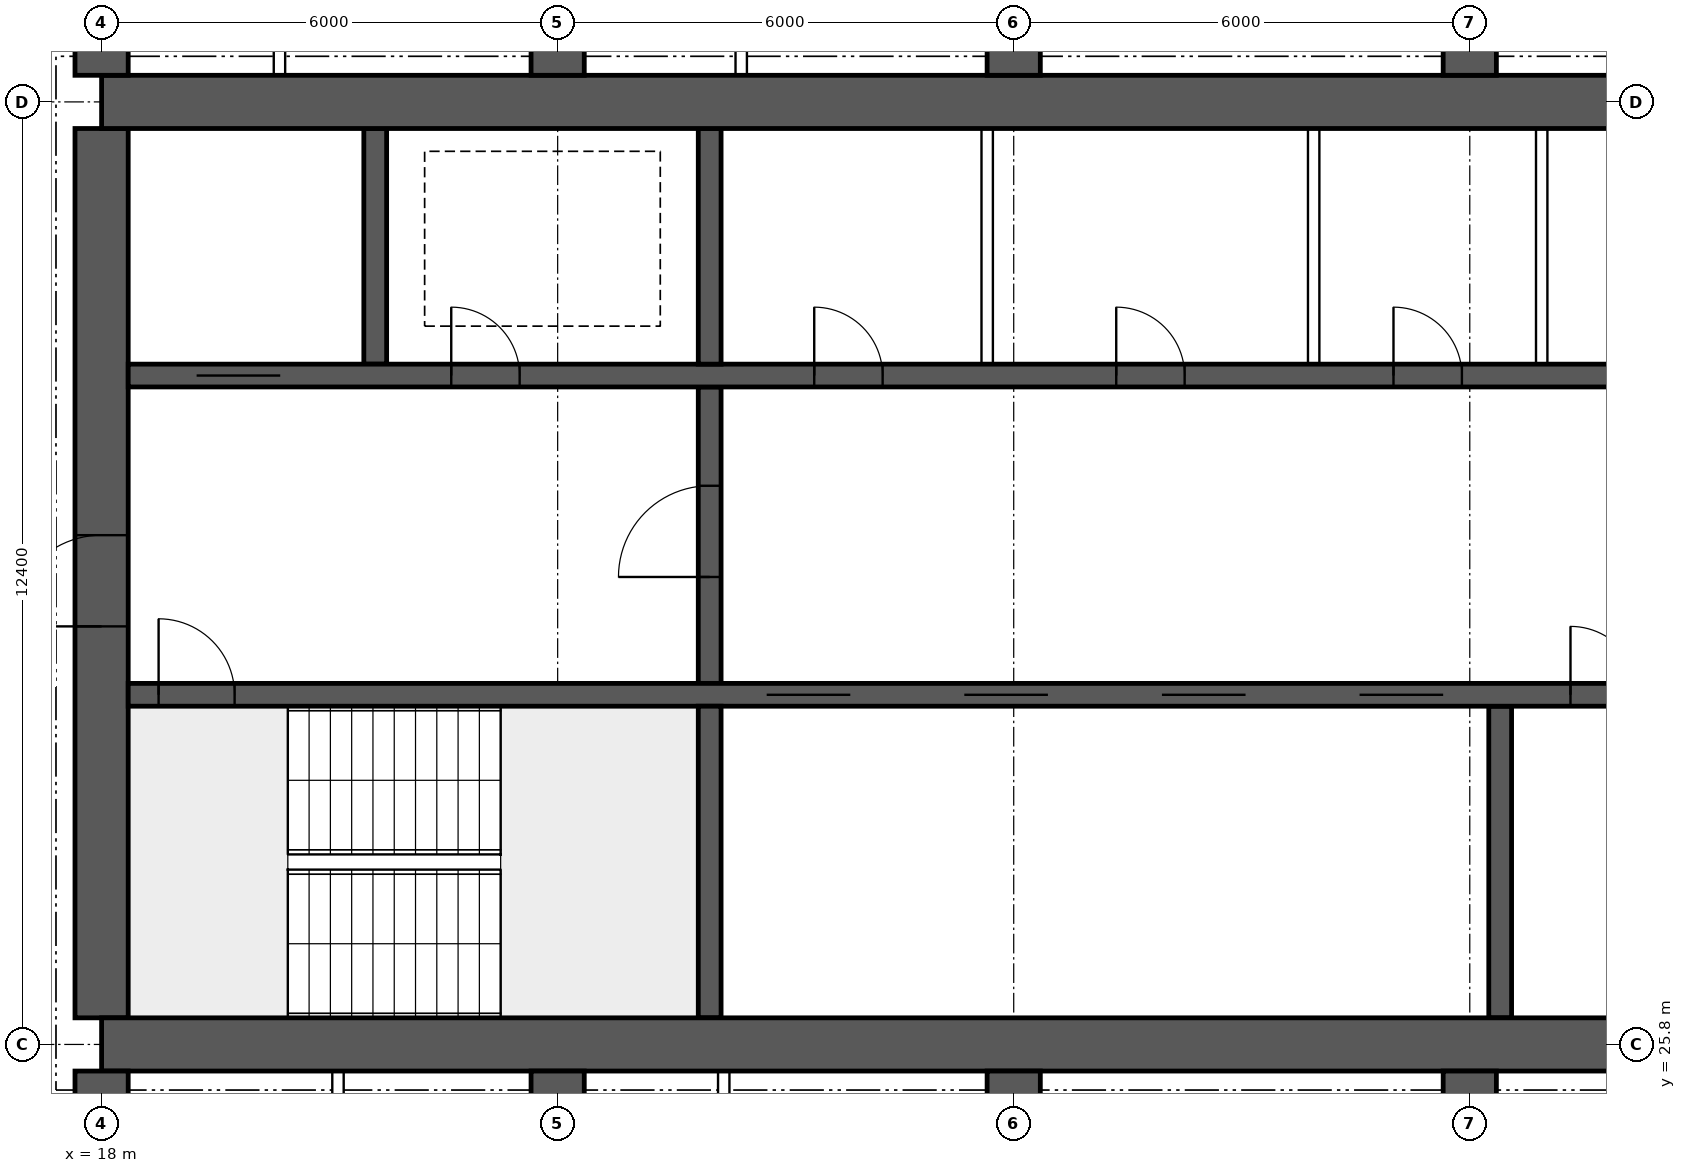
"""IFC4 building model, lengths in metres.
Left out: names, types, materials, properties, quantities, classifications, styles, units other than length and angle.
Written with IfcOpenShell. Run it as: python <this file> out.ifc"""

import sys

from ifc_helpers import new_model, si_unit, direction, frame, frame_2d, origin, place, context, subcontext, project, spatial, rectangle, extrude, element, fill, save


model = new_model("IFC4")
c1 = context("Model", 3, precision=1e-05, world=origin(), true_north=direction((0.0, 1.0)))
c2 = subcontext(c1, "Body", "Model", "MODEL_VIEW")
j1 = project(units=[si_unit("LENGTHUNIT", "METRE"), si_unit("PLANEANGLEUNIT", "RADIAN")], contexts=[c1])
p1 = place(None, origin())
s1 = spatial("IfcSite", under=j1, at=p1, CompositionType="ELEMENT")
p2 = place(p1, origin())
s2 = spatial("IfcBuilding", under=s1, at=p2, CompositionType="ELEMENT")
p3 = place(p2, frame((0.0, 0.0, 250.3)))
s3 = spatial("IfcBuildingStorey", under=s2, at=p3, CompositionType="ELEMENT", Elevation=250.3)
for number, where, z_axis, x_axis in (
    (1, (18.0, 25.8, 0.0), (0.0, 0.0, 1.0), (1.0, 0.0, 0.0)),
    (2, (18.0, 38.2, 0.0), (0.0, 0.0, 1.0), (1.0, 0.0, 0.0)),
):
    element("IfcWall", number, at=place(p3, frame(where, z_axis=z_axis, x_axis=x_axis)), inside=s3, PredefinedType="SHEAR", context=c2, shape_type="SweptSolid", body=[
        extrude(rectangle(XDim=48.0, YDim=0.7, at=frame_2d((24.0, 0.0))), origin(), (0.0, 0.0, 1.0), 3.75),
    ])
p4 = place(p3, frame((18.0, 26.15, 0.0), z_axis=(0.0, 0.0, 1.0), x_axis=(0.0, 1.0, 0.0)))
e3 = element("IfcWall", 3, at=p4, inside=s3, PredefinedType="SHEAR", context=c2, shape_type="SweptSolid", body=[
    extrude(rectangle(XDim=11.7, YDim=0.7, at=frame_2d((5.85, 0.0))), origin(), (0.0, 0.0, 1.0), 3.75),
])
p5 = place(p4, frame((5.15, 0.0, 0.0)))
e4 = element("IfcOpeningElement", 4, at=p5, cuts=e3, PredefinedType="OPENING", context=c2, shape_type="SweptSolid", body=[
    extrude(rectangle(XDim=1.2, YDim=2.1, at=frame_2d((0.6, 1.05))), frame((0.0, 0.36, 0.0), z_axis=(0.0, -1.0, 0.0), x_axis=(1.0, 0.0, 0.0)), (0.0, 0.0, 1.0), 0.72),
])
p6 = place(p3, frame((18.35, 30.4, 0.0), z_axis=(0.0, 0.0, 1.0), x_axis=(1.0, 0.0, 0.0)))
e5 = element("IfcWall", 5, at=p6, inside=s3, PredefinedType="SHEAR", context=c2, shape_type="SweptSolid", body=[
    extrude(rectangle(XDim=47.3, YDim=0.3, at=frame_2d((23.65, 0.0))), origin(), (0.0, 0.0, 1.0), 3.75),
])
p7 = place(p6, frame((0.4, 0.0, 0.0)))
e6 = element("IfcOpeningElement", 6, at=p7, cuts=e5, PredefinedType="OPENING", context=c2, shape_type="SweptSolid", body=[
    extrude(rectangle(XDim=1.0, YDim=2.1, at=frame_2d((0.5, 1.05))), frame((0.0, 0.16, 0.0), z_axis=(0.0, -1.0, 0.0), x_axis=(1.0, 0.0, 0.0)), (0.0, 0.0, 1.0), 0.32),
])
p8 = place(p6, frame((45.9, 0.0, 0.0)))
e7 = element("IfcOpeningElement", 7, at=p8, cuts=e5, PredefinedType="OPENING", context=c2, shape_type="SweptSolid", body=[
    extrude(rectangle(XDim=1.0, YDim=2.1, at=frame_2d((0.5, 1.05))), frame((0.0, 0.16, 0.0), z_axis=(0.0, -1.0, 0.0), x_axis=(1.0, 0.0, 0.0)), (0.0, 0.0, 1.0), 0.32),
])
p9 = place(p6, frame((8.4, 0.0, 0.0)))
e8 = element("IfcOpeningElement", 8, at=p9, cuts=e5, PredefinedType="OPENING", context=c2, shape_type="SweptSolid", body=[
    extrude(rectangle(XDim=1.1, YDim=2.1, at=frame_2d((0.55, 1.05))), frame((0.0, 0.16, 0.0), z_axis=(0.0, -1.0, 0.0), x_axis=(1.0, 0.0, 0.0)), (0.0, 0.0, 1.0), 0.32),
])
p10 = place(p6, frame((11.0, 0.0, 0.0)))
e9 = element("IfcOpeningElement", 9, at=p10, cuts=e5, PredefinedType="OPENING", context=c2, shape_type="SweptSolid", body=[
    extrude(rectangle(XDim=1.1, YDim=2.1, at=frame_2d((0.55, 1.05))), frame((0.0, 0.16, 0.0), z_axis=(0.0, -1.0, 0.0), x_axis=(1.0, 0.0, 0.0)), (0.0, 0.0, 1.0), 0.32),
])
p11 = place(p6, frame((13.6, 0.0, 0.0)))
e10 = element("IfcOpeningElement", 10, at=p11, cuts=e5, PredefinedType="OPENING", context=c2, shape_type="SweptSolid", body=[
    extrude(rectangle(XDim=1.1, YDim=2.1, at=frame_2d((0.55, 1.05))), frame((0.0, 0.16, 0.0), z_axis=(0.0, -1.0, 0.0), x_axis=(1.0, 0.0, 0.0)), (0.0, 0.0, 1.0), 0.32),
])
p12 = place(p6, frame((16.2, 0.0, 0.0)))
e11 = element("IfcOpeningElement", 11, at=p12, cuts=e5, PredefinedType="OPENING", context=c2, shape_type="SweptSolid", body=[
    extrude(rectangle(XDim=1.1, YDim=2.1, at=frame_2d((0.55, 1.05))), frame((0.0, 0.16, 0.0), z_axis=(0.0, -1.0, 0.0), x_axis=(1.0, 0.0, 0.0)), (0.0, 0.0, 1.0), 0.32),
])
p13 = place(p6, frame((18.975, 0.0, 0.0)))
e12 = element("IfcOpeningElement", 12, at=p13, cuts=e5, PredefinedType="OPENING", context=c2, shape_type="SweptSolid", body=[
    extrude(rectangle(XDim=0.9, YDim=2.1, at=frame_2d((0.45, 1.05))), frame((0.0, 0.16, 0.0), z_axis=(0.0, -1.0, 0.0), x_axis=(1.0, 0.0, 0.0)), (0.0, 0.0, 1.0), 0.32),
])
p14 = place(p6, frame((24.475, 0.0, 0.0)))
e13 = element("IfcOpeningElement", 13, at=p14, cuts=e5, PredefinedType="OPENING", context=c2, shape_type="SweptSolid", body=[
    extrude(rectangle(XDim=0.9, YDim=2.1, at=frame_2d((0.45, 1.05))), frame((0.0, 0.16, 0.0), z_axis=(0.0, -1.0, 0.0), x_axis=(1.0, 0.0, 0.0)), (0.0, 0.0, 1.0), 0.32),
])
p15 = place(p6, frame((30.267, 0.0, 0.0)))
e14 = element("IfcOpeningElement", 14, at=p15, cuts=e5, PredefinedType="OPENING", context=c2, shape_type="SweptSolid", body=[
    extrude(rectangle(XDim=1.1, YDim=2.1, at=frame_2d((0.55, 1.05))), frame((0.0, 0.16, 0.0), z_axis=(0.0, -1.0, 0.0), x_axis=(1.0, 0.0, 0.0)), (0.0, 0.0, 1.0), 0.32),
])
p16 = place(p6, frame((33.8, 0.0, 0.0)))
e15 = element("IfcOpeningElement", 15, at=p16, cuts=e5, PredefinedType="OPENING", context=c2, shape_type="SweptSolid", body=[
    extrude(rectangle(XDim=1.1, YDim=2.1, at=frame_2d((0.55, 1.05))), frame((0.0, 0.16, 0.0), z_axis=(0.0, -1.0, 0.0), x_axis=(1.0, 0.0, 0.0)), (0.0, 0.0, 1.0), 0.32),
])
p17 = place(p6, frame((37.333, 0.0, 0.0)))
e16 = element("IfcOpeningElement", 16, at=p17, cuts=e5, PredefinedType="OPENING", context=c2, shape_type="SweptSolid", body=[
    extrude(rectangle(XDim=1.1, YDim=2.1, at=frame_2d((0.55, 1.05))), frame((0.0, 0.16, 0.0), z_axis=(0.0, -1.0, 0.0), x_axis=(1.0, 0.0, 0.0)), (0.0, 0.0, 1.0), 0.32),
])
p18 = place(p3, frame((18.35, 34.6, 0.0), z_axis=(0.0, 0.0, 1.0), x_axis=(1.0, 0.0, 0.0)))
e17 = element("IfcWall", 17, at=p18, inside=s3, PredefinedType="SHEAR", context=c2, shape_type="SweptSolid", body=[
    extrude(rectangle(XDim=47.3, YDim=0.3, at=frame_2d((23.65, 0.0))), origin(), (0.0, 0.0, 1.0), 3.75),
])
p19 = place(p18, frame((0.9, 0.0, 0.0)))
e18 = element("IfcOpeningElement", 18, at=p19, cuts=e17, PredefinedType="OPENING", context=c2, shape_type="SweptSolid", body=[
    extrude(rectangle(XDim=1.1, YDim=2.1, at=frame_2d((0.55, 1.05))), frame((0.0, 0.16, 0.0), z_axis=(0.0, -1.0, 0.0), x_axis=(1.0, 0.0, 0.0)), (0.0, 0.0, 1.0), 0.32),
])
p20 = place(p18, frame((45.3, 0.0, 0.0)))
e19 = element("IfcOpeningElement", 19, at=p20, cuts=e17, PredefinedType="OPENING", context=c2, shape_type="SweptSolid", body=[
    extrude(rectangle(XDim=1.1, YDim=2.1, at=frame_2d((0.55, 1.05))), frame((0.0, 0.16, 0.0), z_axis=(0.0, -1.0, 0.0), x_axis=(1.0, 0.0, 0.0)), (0.0, 0.0, 1.0), 0.32),
])
p21 = place(p18, frame((4.25, 0.0, 0.0)))
e20 = element("IfcOpeningElement", 20, at=p21, cuts=e17, PredefinedType="OPENING", context=c2, shape_type="SweptSolid", body=[
    extrude(rectangle(XDim=0.9, YDim=2.1, at=frame_2d((0.45, 1.05))), frame((0.0, 0.16, 0.0), z_axis=(0.0, -1.0, 0.0), x_axis=(1.0, 0.0, 0.0)), (0.0, 0.0, 1.0), 0.32),
])
p22 = place(p18, frame((42.15, 0.0, 0.0)))
e21 = element("IfcOpeningElement", 21, at=p22, cuts=e17, PredefinedType="OPENING", context=c2, shape_type="SweptSolid", body=[
    extrude(rectangle(XDim=0.9, YDim=2.1, at=frame_2d((0.45, 1.05))), frame((0.0, 0.16, 0.0), z_axis=(0.0, -1.0, 0.0), x_axis=(1.0, 0.0, 0.0)), (0.0, 0.0, 1.0), 0.32),
])
p23 = place(p18, frame((9.025, 0.0, 0.0)))
e22 = element("IfcOpeningElement", 22, at=p23, cuts=e17, PredefinedType="OPENING", context=c2, shape_type="SweptSolid", body=[
    extrude(rectangle(XDim=0.9, YDim=2.1, at=frame_2d((0.45, 1.05))), frame((0.0, 0.16, 0.0), z_axis=(0.0, -1.0, 0.0), x_axis=(1.0, 0.0, 0.0)), (0.0, 0.0, 1.0), 0.32),
])
p24 = place(p18, frame((12.999, 0.0, 0.0)))
e23 = element("IfcOpeningElement", 23, at=p24, cuts=e17, PredefinedType="OPENING", context=c2, shape_type="SweptSolid", body=[
    extrude(rectangle(XDim=0.9, YDim=2.1, at=frame_2d((0.45, 1.05))), frame((0.0, 0.16, 0.0), z_axis=(0.0, -1.0, 0.0), x_axis=(1.0, 0.0, 0.0)), (0.0, 0.0, 1.0), 0.32),
])
p25 = place(p18, frame((16.646, 0.0, 0.0)))
e24 = element("IfcOpeningElement", 24, at=p25, cuts=e17, PredefinedType="OPENING", context=c2, shape_type="SweptSolid", body=[
    extrude(rectangle(XDim=0.9, YDim=2.1, at=frame_2d((0.45, 1.05))), frame((0.0, 0.16, 0.0), z_axis=(0.0, -1.0, 0.0), x_axis=(1.0, 0.0, 0.0)), (0.0, 0.0, 1.0), 0.32),
])
p26 = place(p18, frame((20.405, 0.0, 0.0)))
e25 = element("IfcOpeningElement", 25, at=p26, cuts=e17, PredefinedType="OPENING", context=c2, shape_type="SweptSolid", body=[
    extrude(rectangle(XDim=0.9, YDim=2.1, at=frame_2d((0.45, 1.05))), frame((0.0, 0.16, 0.0), z_axis=(0.0, -1.0, 0.0), x_axis=(1.0, 0.0, 0.0)), (0.0, 0.0, 1.0), 0.32),
])
p27 = place(p18, frame((24.811, 0.0, 0.0)))
e26 = element("IfcOpeningElement", 26, at=p27, cuts=e17, PredefinedType="OPENING", context=c2, shape_type="SweptSolid", body=[
    extrude(rectangle(XDim=0.9, YDim=2.1, at=frame_2d((0.45, 1.05))), frame((0.0, 0.16, 0.0), z_axis=(0.0, -1.0, 0.0), x_axis=(1.0, 0.0, 0.0)), (0.0, 0.0, 1.0), 0.32),
])
p28 = place(p18, frame((27.608, 0.0, 0.0)))
e27 = element("IfcOpeningElement", 27, at=p28, cuts=e17, PredefinedType="OPENING", context=c2, shape_type="SweptSolid", body=[
    extrude(rectangle(XDim=0.9, YDim=2.1, at=frame_2d((0.45, 1.05))), frame((0.0, 0.16, 0.0), z_axis=(0.0, -1.0, 0.0), x_axis=(1.0, 0.0, 0.0)), (0.0, 0.0, 1.0), 0.32),
])
p29 = place(p18, frame((29.981, 0.0, 0.0)))
e28 = element("IfcOpeningElement", 28, at=p29, cuts=e17, PredefinedType="OPENING", context=c2, shape_type="SweptSolid", body=[
    extrude(rectangle(XDim=0.9, YDim=2.1, at=frame_2d((0.45, 1.05))), frame((0.0, 0.16, 0.0), z_axis=(0.0, -1.0, 0.0), x_axis=(1.0, 0.0, 0.0)), (0.0, 0.0, 1.0), 0.32),
])
p30 = place(p18, frame((35.451, 0.0, 0.0)))
e29 = element("IfcOpeningElement", 29, at=p30, cuts=e17, PredefinedType="OPENING", context=c2, shape_type="SweptSolid", body=[
    extrude(rectangle(XDim=0.9, YDim=2.1, at=frame_2d((0.45, 1.05))), frame((0.0, 0.16, 0.0), z_axis=(0.0, -1.0, 0.0), x_axis=(1.0, 0.0, 0.0)), (0.0, 0.0, 1.0), 0.32),
])
p31 = place(p3, frame((26.0, 26.15, 0.0), z_axis=(0.0, 0.0, 1.0), x_axis=(0.0, 1.0, 0.0)))
e30 = element("IfcWall", 30, at=p31, inside=s3, PredefinedType="SHEAR", context=c2, shape_type="SweptSolid", body=[
    extrude(rectangle(XDim=4.1, YDim=0.3, at=frame_2d((2.05, 0.0))), origin(), (0.0, 0.0, 1.0), 3.75),
])
p32 = place(p3, frame((26.0, 30.55, 0.0), z_axis=(0.0, 0.0, 1.0), x_axis=(0.0, 1.0, 0.0)))
e31 = element("IfcWall", 31, at=p32, inside=s3, PredefinedType="SHEAR", context=c2, shape_type="SweptSolid", body=[
    extrude(rectangle(XDim=3.9, YDim=0.3, at=frame_2d((1.95, 0.0))), origin(), (0.0, 0.0, 1.0), 3.75),
])
p33 = place(p32, frame((1.4, 0.0, 0.0)))
e32 = element("IfcOpeningElement", 32, at=p33, cuts=e31, PredefinedType="OPENING", context=c2, shape_type="SweptSolid", body=[
    extrude(rectangle(XDim=1.2, YDim=2.1, at=frame_2d((0.6, 1.05))), frame((0.0, 0.16, 0.0), z_axis=(0.0, -1.0, 0.0), x_axis=(1.0, 0.0, 0.0)), (0.0, 0.0, 1.0), 0.32),
])
for number, where, z_axis, x_axis in (
    (33, (21.6, 34.75, 0.0), (0.0, 0.0, 1.0), (0.0, 1.0, 0.0)),
    (34, (26.0, 34.75, 0.0), (0.0, 0.0, 1.0), (0.0, 1.0, 0.0)),
):
    element("IfcWall", number, at=place(p3, frame(where, z_axis=z_axis, x_axis=x_axis)), inside=s3, PredefinedType="SHEAR", context=c2, shape_type="SweptSolid", body=[
        extrude(rectangle(XDim=3.1, YDim=0.3, at=frame_2d((1.55, 0.0))), origin(), (0.0, 0.0, 1.0), 3.75),
    ])
p34 = place(p3, frame((36.4, 26.15, 0.0), z_axis=(0.0, 0.0, 1.0), x_axis=(0.0, 1.0, 0.0)))
e35 = element("IfcWall", 35, at=p34, inside=s3, PredefinedType="SHEAR", context=c2, shape_type="SweptSolid", body=[
    extrude(rectangle(XDim=4.1, YDim=0.3, at=frame_2d((2.05, 0.0))), origin(), (0.0, 0.0, 1.0), 3.75),
])
for number, where, z_axis, x_axis in (
    (36, (18.0, 18.4, 0.0), (0.0, 0.0, 1.0), (0.0, 1.0, 0.0)),
    (37, (18.0, 38.55, 0.0), (0.0, 0.0, 1.0), (0.0, 1.0, 0.0)),
    (38, (24.0, 18.4, 0.0), (0.0, 0.0, 1.0), (0.0, 1.0, 0.0)),
    (39, (24.0, 38.55, 0.0), (0.0, 0.0, 1.0), (0.0, 1.0, 0.0)),
    (40, (30.0, 18.4, 0.0), (0.0, 0.0, 1.0), (0.0, 1.0, 0.0)),
    (41, (30.0, 38.55, 0.0), (0.0, 0.0, 1.0), (0.0, 1.0, 0.0)),
    (42, (36.0, 18.4, 0.0), (0.0, 0.0, 1.0), (0.0, 1.0, 0.0)),
    (43, (36.0, 38.55, 0.0), (0.0, 0.0, 1.0), (0.0, 1.0, 0.0)),
):
    element("IfcWall", number, at=place(p3, frame(where, z_axis=z_axis, x_axis=x_axis)), inside=s3, PredefinedType="SHEAR", context=c2, shape_type="SweptSolid", body=[
        extrude(rectangle(XDim=7.05, YDim=0.7, at=frame_2d((3.525, 0.0))), origin(), (0.0, 0.0, 1.0), 3.75),
    ])
for number, where, z_axis, x_axis in (
    (44, (29.651, 34.75, 0.0), (0.0, 0.0, 1.0), (0.0, 1.0, 0.0)),
    (45, (33.946, 34.75, 0.0), (0.0, 0.0, 1.0), (0.0, 1.0, 0.0)),
    (46, (36.946, 34.75, 0.0), (0.0, 0.0, 1.0), (0.0, 1.0, 0.0)),
):
    element("IfcWall", number, at=place(p3, frame(where, z_axis=z_axis, x_axis=x_axis)), inside=s3, PredefinedType="SOLIDWALL", context=c2, shape_type="SweptSolid", body=[
        extrude(rectangle(XDim=3.1, YDim=0.15, at=frame_2d((1.55, 0.0))), origin(), (0.0, 0.0, 1.0), 3.5),
    ])
for number, where, z_axis, x_axis in (
    (47, (21.11, 18.5, 0.0), (0.0, 0.0, 1.0), (0.0, 1.0, 0.0)),
    (48, (26.185, 18.5, 0.0), (0.0, 0.0, 1.0), (0.0, 1.0, 0.0)),
    (49, (20.34, 38.55, 0.0), (0.0, 0.0, 1.0), (0.0, 1.0, 0.0)),
    (50, (26.415, 38.55, 0.0), (0.0, 0.0, 1.0), (0.0, 1.0, 0.0)),
):
    element("IfcWall", number, at=place(p3, frame(where, z_axis=z_axis, x_axis=x_axis)), inside=s3, PredefinedType="PARTITIONING", context=c2, shape_type="SweptSolid", body=[
        extrude(rectangle(XDim=6.95, YDim=0.15, at=frame_2d((3.475, 0.0))), origin(), (0.0, 0.0, 1.0), 3.5),
    ])
p35 = place(p5, origin())
e51 = element("IfcDoor", 51, at=p35, inside=s3, OperationType="SINGLE_SWING_LEFT", PredefinedType="DOOR", context=c2, shape_type="SweptSolid", body=[
    extrude(rectangle(XDim=1.2, YDim=2.1, at=frame_2d((0.6, 1.05))), frame((0.0, 0.025, 0.0), z_axis=(0.0, -1.0, 0.0), x_axis=(1.0, 0.0, 0.0)), (0.0, 0.0, 1.0), 0.05),
])
fill(e4, e51)
p36 = place(p7, origin())
e52 = element("IfcDoor", 52, at=p36, inside=s3, OperationType="SINGLE_SWING_LEFT", PredefinedType="DOOR", context=c2, shape_type="SweptSolid", body=[
    extrude(rectangle(XDim=1.0, YDim=2.1, at=frame_2d((0.5, 1.05))), frame((0.0, 0.025, 0.0), z_axis=(0.0, -1.0, 0.0), x_axis=(1.0, 0.0, 0.0)), (0.0, 0.0, 1.0), 0.05),
])
fill(e6, e52)
p37 = place(p19, origin())
e53 = element("IfcDoor", 53, at=p37, inside=s3, OperationType="DOUBLE_DOOR_SLIDING", PredefinedType="DOOR", context=c2, shape_type="SweptSolid", body=[
    extrude(rectangle(XDim=1.1, YDim=2.1, at=frame_2d((0.55, 1.05))), frame((0.0, 0.025, 0.0), z_axis=(0.0, -1.0, 0.0), x_axis=(1.0, 0.0, 0.0)), (0.0, 0.0, 1.0), 0.05),
])
fill(e18, e53)
p38 = place(p21, origin())
e54 = element("IfcDoor", 54, at=p38, inside=s3, OperationType="SINGLE_SWING_LEFT", PredefinedType="DOOR", context=c2, shape_type="SweptSolid", body=[
    extrude(rectangle(XDim=0.9, YDim=2.1, at=frame_2d((0.45, 1.05))), frame((0.0, 0.025, 0.0), z_axis=(0.0, -1.0, 0.0), x_axis=(1.0, 0.0, 0.0)), (0.0, 0.0, 1.0), 0.05),
])
fill(e20, e54)
p39 = place(p33, origin())
e55 = element("IfcDoor", 55, at=p39, inside=s3, OperationType="SINGLE_SWING_LEFT", PredefinedType="DOOR", context=c2, shape_type="SweptSolid", body=[
    extrude(rectangle(XDim=1.2, YDim=2.1, at=frame_2d((0.6, 1.05))), frame((0.0, 0.025, 0.0), z_axis=(0.0, -1.0, 0.0), x_axis=(1.0, 0.0, 0.0)), (0.0, 0.0, 1.0), 0.05),
])
fill(e32, e55)
p40 = place(p23, origin())
e56 = element("IfcDoor", 56, at=p40, inside=s3, OperationType="SINGLE_SWING_LEFT", PredefinedType="DOOR", context=c2, shape_type="SweptSolid", body=[
    extrude(rectangle(XDim=0.9, YDim=2.1, at=frame_2d((0.45, 1.05))), frame((0.0, 0.025, 0.0), z_axis=(0.0, -1.0, 0.0), x_axis=(1.0, 0.0, 0.0)), (0.0, 0.0, 1.0), 0.05),
])
fill(e22, e56)
p41 = place(p24, origin())
e57 = element("IfcDoor", 57, at=p41, inside=s3, OperationType="SINGLE_SWING_LEFT", PredefinedType="DOOR", context=c2, shape_type="SweptSolid", body=[
    extrude(rectangle(XDim=0.9, YDim=2.1, at=frame_2d((0.45, 1.05))), frame((0.0, 0.025, 0.0), z_axis=(0.0, -1.0, 0.0), x_axis=(1.0, 0.0, 0.0)), (0.0, 0.0, 1.0), 0.05),
])
fill(e23, e57)
p42 = place(p25, origin())
e58 = element("IfcDoor", 58, at=p42, inside=s3, OperationType="SINGLE_SWING_LEFT", PredefinedType="DOOR", context=c2, shape_type="SweptSolid", body=[
    extrude(rectangle(XDim=0.9, YDim=2.1, at=frame_2d((0.45, 1.05))), frame((0.0, 0.025, 0.0), z_axis=(0.0, -1.0, 0.0), x_axis=(1.0, 0.0, 0.0)), (0.0, 0.0, 1.0), 0.05),
])
fill(e24, e58)
p43 = place(p9, origin())
e59 = element("IfcDoor", 59, at=p43, inside=s3, OperationType="DOUBLE_DOOR_SLIDING", PredefinedType="DOOR", context=c2, shape_type="SweptSolid", body=[
    extrude(rectangle(XDim=1.1, YDim=2.1, at=frame_2d((0.55, 1.05))), frame((0.0, 0.025, 0.0), z_axis=(0.0, -1.0, 0.0), x_axis=(1.0, 0.0, 0.0)), (0.0, 0.0, 1.0), 0.05),
])
fill(e8, e59)
p44 = place(p10, origin())
e60 = element("IfcDoor", 60, at=p44, inside=s3, OperationType="DOUBLE_DOOR_SLIDING", PredefinedType="DOOR", context=c2, shape_type="SweptSolid", body=[
    extrude(rectangle(XDim=1.1, YDim=2.1, at=frame_2d((0.55, 1.05))), frame((0.0, 0.025, 0.0), z_axis=(0.0, -1.0, 0.0), x_axis=(1.0, 0.0, 0.0)), (0.0, 0.0, 1.0), 0.05),
])
fill(e9, e60)
p45 = place(p11, origin())
e61 = element("IfcDoor", 61, at=p45, inside=s3, OperationType="DOUBLE_DOOR_SLIDING", PredefinedType="DOOR", context=c2, shape_type="SweptSolid", body=[
    extrude(rectangle(XDim=1.1, YDim=2.1, at=frame_2d((0.55, 1.05))), frame((0.0, 0.025, 0.0), z_axis=(0.0, -1.0, 0.0), x_axis=(1.0, 0.0, 0.0)), (0.0, 0.0, 1.0), 0.05),
])
fill(e10, e61)
p46 = place(p12, origin())
e62 = element("IfcDoor", 62, at=p46, inside=s3, OperationType="DOUBLE_DOOR_SLIDING", PredefinedType="DOOR", context=c2, shape_type="SweptSolid", body=[
    extrude(rectangle(XDim=1.1, YDim=2.1, at=frame_2d((0.55, 1.05))), frame((0.0, 0.025, 0.0), z_axis=(0.0, -1.0, 0.0), x_axis=(1.0, 0.0, 0.0)), (0.0, 0.0, 1.0), 0.05),
])
fill(e11, e62)
p47 = place(p13, origin())
e63 = element("IfcDoor", 63, at=p47, inside=s3, OperationType="SINGLE_SWING_LEFT", PredefinedType="DOOR", context=c2, shape_type="SweptSolid", body=[
    extrude(rectangle(XDim=0.9, YDim=2.1, at=frame_2d((0.45, 1.05))), frame((0.0, 0.025, 0.0), z_axis=(0.0, -1.0, 0.0), x_axis=(1.0, 0.0, 0.0)), (0.0, 0.0, 1.0), 0.05),
])
fill(e12, e63)
save(model, sys.argv[1])
